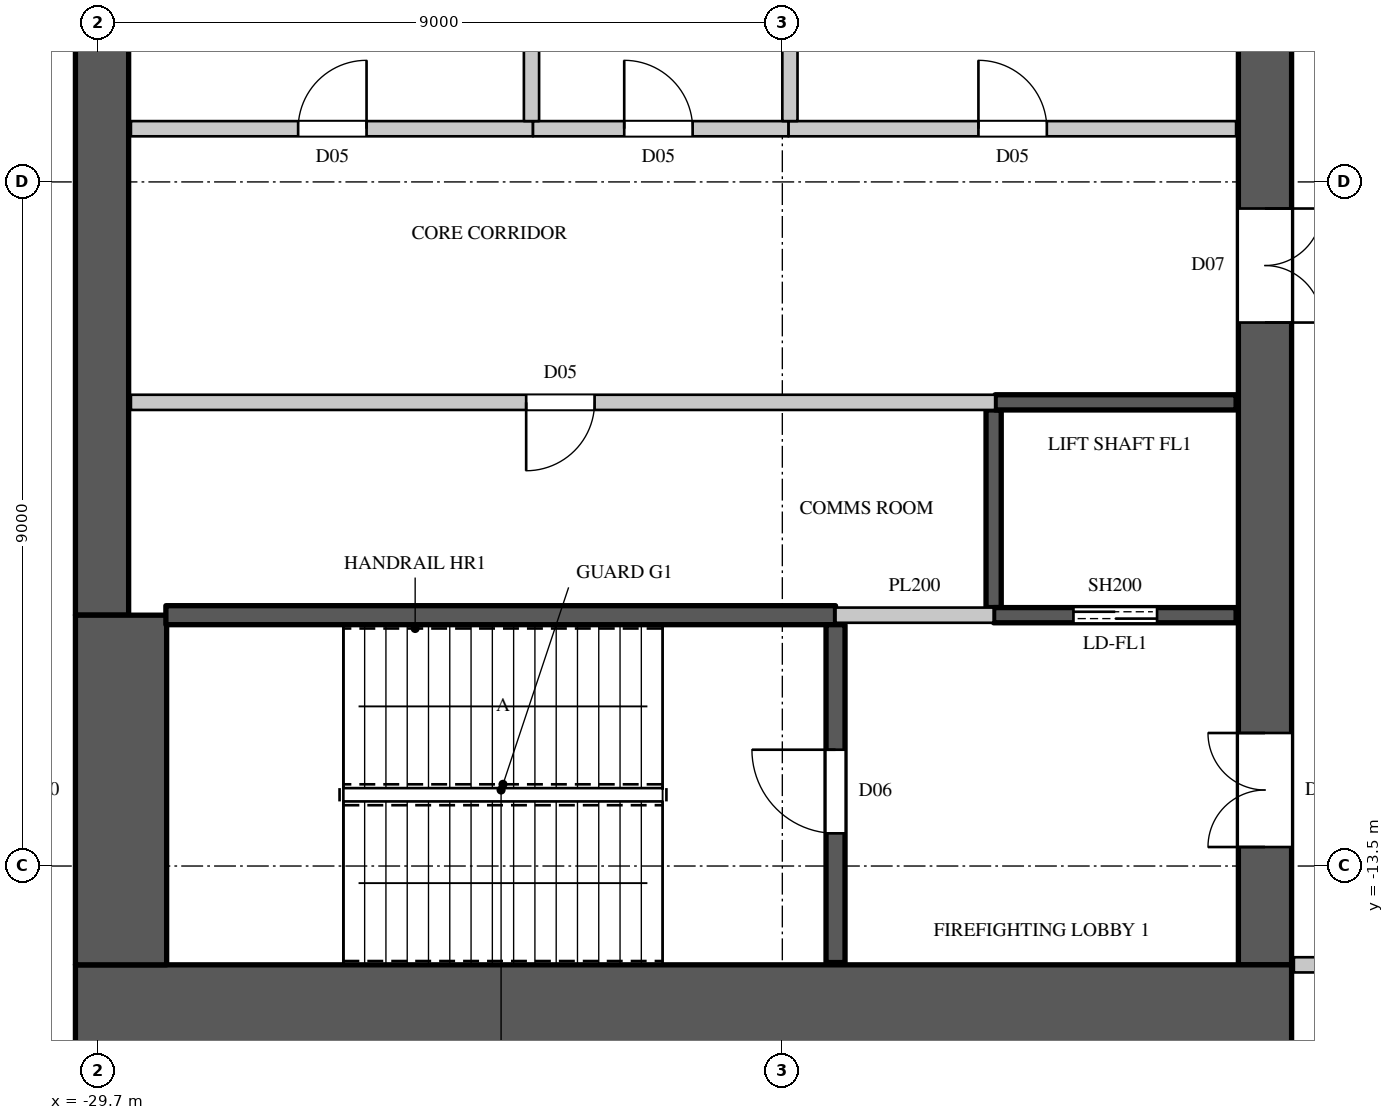
"""IFC4 building model, lengths in metres.
Left out: names, types, materials, properties, quantities, classifications, styles, units other than length and angle.
Written with IfcOpenShell. Run it as: python <this file> out.ifc"""

import sys

from ifc_helpers import new_model, si_unit, direction, frame, frame_2d, origin, place, context, subcontext, project, spatial, rectangle, extrude, element, fill, save


model = new_model("IFC4")
c1 = context("Model", 3, precision=1e-05, world=origin(), true_north=direction((0.0, 1.0)))
c2 = subcontext(c1, "Body", "Model", "MODEL_VIEW")
j1 = project(units=[si_unit("LENGTHUNIT", "METRE"), si_unit("PLANEANGLEUNIT", "RADIAN")], contexts=[c1])
p1 = place(None, origin())
s1 = spatial("IfcSite", under=j1, at=p1, CompositionType="ELEMENT")
p2 = place(p1, origin())
s2 = spatial("IfcBuilding", under=s1, at=p2, CompositionType="ELEMENT")
p3 = place(p2, frame((0.0, 0.0, 329.5)))
s3 = spatial("IfcBuildingStorey", under=s2, at=p3, CompositionType="ELEMENT", Elevation=329.5)
p4 = place(p3, frame((-30.0, -15.4, 0.0), z_axis=(0.0, 0.0, 1.0), x_axis=(1.0, 0.0, 0.0)))
e1 = element("IfcWall", 1, at=p4, inside=s3, PredefinedType="SHEAR", context=c2, shape_type="SweptSolid", body=[
    extrude(rectangle(XDim=16.0, YDim=1.2, at=frame_2d((8.0, 0.0))), origin(), (0.0, 0.0, 1.0), 5.5),
])
p5 = place(p3, frame((-14.35, -14.8, 0.0), z_axis=(0.0, 0.0, 1.0), x_axis=(0.0, 1.0, 0.0)))
e2 = element("IfcWall", 2, at=p5, inside=s3, PredefinedType="SHEAR", context=c2, shape_type="SweptSolid", body=[
    extrude(rectangle(XDim=29.6, YDim=0.7, at=frame_2d((14.8, 0.0))), origin(), (0.0, 0.0, 1.0), 5.5),
])
p6 = place(p5, frame((1.55, 0.0, 0.0)))
e3 = element("IfcOpeningElement", 3, at=p6, cuts=e2, PredefinedType="OPENING", context=c2, shape_type="SweptSolid", body=[
    extrude(rectangle(XDim=1.5, YDim=2.4, at=frame_2d((0.75, 1.2))), frame((0.0, 0.36, 0.0), z_axis=(0.0, -1.0, 0.0), x_axis=(1.0, 0.0, 0.0)), (0.0, 0.0, 1.0), 0.72),
])
p7 = place(p5, frame((26.55, 0.0, 0.0)))
e4 = element("IfcOpeningElement", 4, at=p7, cuts=e2, PredefinedType="OPENING", context=c2, shape_type="SweptSolid", body=[
    extrude(rectangle(XDim=1.5, YDim=2.4, at=frame_2d((0.75, 1.2))), frame((0.0, 0.36, 0.0), z_axis=(0.0, -1.0, 0.0), x_axis=(1.0, 0.0, 0.0)), (0.0, 0.0, 1.0), 0.72),
])
p8 = place(p5, frame((8.45, 0.0, 0.0)))
e5 = element("IfcOpeningElement", 5, at=p8, cuts=e2, PredefinedType="OPENING", context=c2, shape_type="SweptSolid", body=[
    extrude(rectangle(XDim=1.5, YDim=2.4, at=frame_2d((0.75, 1.2))), frame((0.0, 0.36, 0.0), z_axis=(0.0, -1.0, 0.0), x_axis=(1.0, 0.0, 0.0)), (0.0, 0.0, 1.0), 0.72),
])
p9 = place(p5, frame((19.65, 0.0, 0.0)))
e6 = element("IfcOpeningElement", 6, at=p9, cuts=e2, PredefinedType="OPENING", context=c2, shape_type="SweptSolid", body=[
    extrude(rectangle(XDim=1.5, YDim=2.4, at=frame_2d((0.75, 1.2))), frame((0.0, 0.36, 0.0), z_axis=(0.0, -1.0, 0.0), x_axis=(1.0, 0.0, 0.0)), (0.0, 0.0, 1.0), 0.72),
])
p10 = place(p5, frame((14.5, 0.0, 0.0)))
e7 = element("IfcOpeningElement", 7, at=p10, cuts=e2, PredefinedType="OPENING", context=c2, shape_type="SweptSolid", body=[
    extrude(rectangle(XDim=0.6, YDim=2.0, at=frame_2d((0.3, 1.0))), frame((0.0, 0.36, 0.0), z_axis=(0.0, -1.0, 0.0), x_axis=(1.0, 0.0, 0.0)), (0.0, 0.0, 1.0), 0.72),
])
p11 = place(p3, frame((-29.65, -10.2, 0.0), z_axis=(0.0, 0.0, 1.0), x_axis=(0.0, 1.0, 0.0)))
e8 = element("IfcWall", 8, at=p11, inside=s3, PredefinedType="SHEAR", context=c2, shape_type="SweptSolid", body=[
    extrude(rectangle(XDim=20.4, YDim=0.7, at=frame_2d((10.2, 0.0))), origin(), (0.0, 0.0, 1.0), 5.5),
])
p12 = place(p3, frame((-29.4, -14.8, 0.0), z_axis=(0.0, 0.0, 1.0), x_axis=(0.0, 1.0, 0.0)))
e9 = element("IfcWall", 9, at=p12, inside=s3, PredefinedType="SHEAR", context=c2, shape_type="SweptSolid", body=[
    extrude(rectangle(XDim=4.6, YDim=1.2, at=frame_2d((2.3, 0.0))), origin(), (0.0, 0.0, 1.0), 5.5),
])
p13 = place(p3, frame((-29.27, -3.8, 0.0), z_axis=(0.0, 0.0, 1.0), x_axis=(1.0, 0.0, 0.0)))
e10 = element("IfcWall", 10, at=p13, inside=s3, PredefinedType="PARTITIONING", context=c2, shape_type="SweptSolid", body=[
    extrude(rectangle(XDim=5.29, YDim=0.2, at=frame_2d((2.645, 0.0))), origin(), (0.0, 0.0, 1.0), 5.098),
])
p14 = place(p13, frame((2.2, 0.0, 0.0)))
e11 = element("IfcOpeningElement", 11, at=p14, cuts=e10, PredefinedType="OPENING", context=c2, shape_type="SweptSolid", body=[
    extrude(rectangle(XDim=0.9, YDim=2.2, at=frame_2d((0.45, 1.1))), frame((0.0, 0.11, 0.0), z_axis=(0.0, -1.0, 0.0), x_axis=(1.0, 0.0, 0.0)), (0.0, 0.0, 1.0), 0.22),
])
p15 = place(p3, frame((-20.62, -3.8, 0.0), z_axis=(0.0, 0.0, 1.0), x_axis=(1.0, 0.0, 0.0)))
e12 = element("IfcWall", 12, at=p15, inside=s3, PredefinedType="PARTITIONING", context=c2, shape_type="SweptSolid", body=[
    extrude(rectangle(XDim=5.89, YDim=0.2, at=frame_2d((2.945, 0.0))), origin(), (0.0, 0.0, 1.0), 5.098),
])
p16 = place(p15, frame((2.5, 0.0, 0.0)))
e13 = element("IfcOpeningElement", 13, at=p16, cuts=e12, PredefinedType="OPENING", context=c2, shape_type="SweptSolid", body=[
    extrude(rectangle(XDim=0.9, YDim=2.2, at=frame_2d((0.45, 1.1))), frame((0.0, 0.11, 0.0), z_axis=(0.0, -1.0, 0.0), x_axis=(1.0, 0.0, 0.0)), (0.0, 0.0, 1.0), 0.22),
])
p17 = place(p3, frame((-13.97, -14.8, 0.0), z_axis=(0.0, 0.0, 1.0), x_axis=(1.0, 0.0, 0.0)))
e14 = element("IfcWall", 14, at=p17, inside=s3, PredefinedType="PARTITIONING", context=c2, shape_type="SweptSolid", body=[
    extrude(rectangle(XDim=2.27, YDim=0.2, at=frame_2d((1.135, 0.0))), origin(), (0.0, 0.0, 1.0), 5.098),
])
p18 = place(p17, frame((0.3, 0.0, 0.0)))
e15 = element("IfcOpeningElement", 15, at=p18, cuts=e14, PredefinedType="OPENING", context=c2, shape_type="SweptSolid", body=[
    extrude(rectangle(XDim=1.6, YDim=2.4, at=frame_2d((0.8, 1.2))), frame((0.0, 0.11, 0.0), z_axis=(0.0, -1.0, 0.0), x_axis=(1.0, 0.0, 0.0)), (0.0, 0.0, 1.0), 0.22),
])
p19 = place(p3, frame((-29.27, -7.4, 0.0), z_axis=(0.0, 0.0, 1.0), x_axis=(1.0, 0.0, 0.0)))
e16 = element("IfcWall", 16, at=p19, inside=s3, PredefinedType="PARTITIONING", context=c2, shape_type="SweptSolid", body=[
    extrude(rectangle(XDim=11.37, YDim=0.2, at=frame_2d((5.685, 0.0))), origin(), (0.0, 0.0, 1.0), 5.098),
])
p20 = place(p19, frame((5.2, 0.0, 0.0)))
e17 = element("IfcOpeningElement", 17, at=p20, cuts=e16, PredefinedType="OPENING", context=c2, shape_type="SweptSolid", body=[
    extrude(rectangle(XDim=0.9, YDim=2.2, at=frame_2d((0.45, 1.1))), frame((0.0, 0.11, 0.0), z_axis=(0.0, -1.0, 0.0), x_axis=(1.0, 0.0, 0.0)), (0.0, 0.0, 1.0), 0.22),
])
p21 = place(p3, frame((-23.98, -3.8, 0.0), z_axis=(0.0, 0.0, 1.0), x_axis=(1.0, 0.0, 0.0)))
e18 = element("IfcWall", 18, at=p21, inside=s3, PredefinedType="PARTITIONING", context=c2, shape_type="SweptSolid", body=[
    extrude(rectangle(XDim=3.36, YDim=0.2, at=frame_2d((1.68, 0.0))), origin(), (0.0, 0.0, 1.0), 5.098),
])
p22 = place(p21, frame((1.2, 0.0, 0.0)))
e19 = element("IfcOpeningElement", 19, at=p22, cuts=e18, PredefinedType="OPENING", context=c2, shape_type="SweptSolid", body=[
    extrude(rectangle(XDim=0.9, YDim=2.2, at=frame_2d((0.45, 1.1))), frame((0.0, 0.11, 0.0), z_axis=(0.0, -1.0, 0.0), x_axis=(1.0, 0.0, 0.0)), (0.0, 0.0, 1.0), 0.22),
])
for number, where, z_axis, x_axis in (
    (20, (-24.0, -3.7, 0.0), (0.0, 0.0, 1.0), (0.0, 1.0, 0.0)),
    (21, (-20.6, -3.7, 0.0), (0.0, 0.0, 1.0), (0.0, 1.0, 0.0)),
):
    element("IfcWall", number, at=place(p3, frame(where, z_axis=z_axis, x_axis=x_axis)), inside=s3, PredefinedType="PARTITIONING", context=c2, shape_type="SweptSolid", body=[
        extrude(rectangle(XDim=2.6, YDim=0.2, at=frame_2d((1.3, 0.0))), origin(), (0.0, 0.0, 1.0), 5.098),
    ])
p23 = place(p3, frame((-20.0, -10.2, 0.0), z_axis=(0.0, 0.0, 1.0), x_axis=(1.0, 0.0, 0.0)))
e22 = element("IfcWall", 22, at=p23, inside=s3, PredefinedType="PARTITIONING", context=c2, shape_type="SweptSolid", body=[
    extrude(rectangle(XDim=2.08, YDim=0.2, at=frame_2d((1.04, 0.0))), origin(), (0.0, 0.0, 1.0), 5.098),
])
p24 = place(p3, frame((-17.92, -10.1, 0.0), z_axis=(0.0, 0.0, 1.0), x_axis=(0.0, 1.0, 0.0)))
e23 = element("IfcWall", 23, at=p24, inside=s3, PredefinedType="SHEAR", context=c2, shape_type="SweptSolid", body=[
    extrude(rectangle(XDim=2.6, YDim=0.2, at=frame_2d((1.3, 0.0))), origin(), (0.0, 0.0, 1.0), 5.098),
])
p25 = place(p3, frame((-17.92, -10.2, 0.0), z_axis=(0.0, 0.0, 1.0), x_axis=(1.0, 0.0, 0.0)))
e24 = element("IfcWall", 24, at=p25, inside=s3, PredefinedType="SHEAR", context=c2, shape_type="SweptSolid", body=[
    extrude(rectangle(XDim=3.19, YDim=0.2, at=frame_2d((1.595, 0.0))), origin(), (0.0, 0.0, 1.0), 5.098),
])
p26 = place(p25, frame((1.05, 0.0, 0.0)))
e25 = element("IfcOpeningElement", 25, at=p26, cuts=e24, PredefinedType="OPENING", context=c2, shape_type="SweptSolid", body=[
    extrude(rectangle(XDim=1.1, YDim=2.2, at=frame_2d((0.55, 1.1))), frame((0.0, 0.11, 0.0), z_axis=(0.0, -1.0, 0.0), x_axis=(1.0, 0.0, 0.0)), (0.0, 0.0, 1.0), 0.22),
])
p27 = place(p3, frame((-17.9, -7.4, 0.0), z_axis=(0.0, 0.0, 1.0), x_axis=(1.0, 0.0, 0.0)))
e26 = element("IfcWall", 26, at=p27, inside=s3, PredefinedType="SHEAR", context=c2, shape_type="SweptSolid", body=[
    extrude(rectangle(XDim=3.17, YDim=0.2, at=frame_2d((1.585, 0.0))), origin(), (0.0, 0.0, 1.0), 5.098),
])
p28 = place(p3, frame((-28.81, -10.2, 0.0), z_axis=(0.0, 0.0, 1.0), x_axis=(1.0, 0.0, 0.0)))
e27 = element("IfcWall", 27, at=p28, inside=s3, PredefinedType="SHEAR", context=c2, shape_type="SweptSolid", body=[
    extrude(rectangle(XDim=8.81, YDim=0.25, at=frame_2d((4.405, 0.0))), origin(), (0.0, 0.0, 1.0), 5.098),
])
p29 = place(p3, frame((-20.0, -14.77, 0.0), z_axis=(0.0, 0.0, 1.0), x_axis=(0.0, 1.0, 0.0)))
e28 = element("IfcWall", 28, at=p29, inside=s3, PredefinedType="SHEAR", context=c2, shape_type="SweptSolid", body=[
    extrude(rectangle(XDim=4.445, YDim=0.25, at=frame_2d((2.223, 0.0))), origin(), (0.0, 0.0, 1.0), 5.098),
])
p30 = place(p29, frame((1.7, 0.0, 0.0)))
e29 = element("IfcOpeningElement", 29, at=p30, cuts=e28, PredefinedType="OPENING", context=c2, shape_type="SweptSolid", body=[
    extrude(rectangle(XDim=1.1, YDim=2.2, at=frame_2d((0.55, 1.1))), frame((0.0, 0.135, 0.0), z_axis=(0.0, -1.0, 0.0), x_axis=(1.0, 0.0, 0.0)), (0.0, 0.0, 1.0), 0.27),
])
p31 = place(p30, origin())
e30 = element("IfcDoor", 30, at=p31, inside=s3, OperationType="SINGLE_SWING_RIGHT", PredefinedType="DOOR", context=c2, shape_type="SweptSolid", body=[
    extrude(rectangle(XDim=1.1, YDim=2.2, at=frame_2d((0.55, 1.1))), frame((0.0, 0.025, 0.0), z_axis=(0.0, -1.0, 0.0), x_axis=(1.0, 0.0, 0.0)), (0.0, 0.0, 1.0), 0.05),
])
fill(e29, e30)
p32 = place(p20, origin())
e31 = element("IfcDoor", 31, at=p32, inside=s3, OperationType="SINGLE_SWING_RIGHT", PredefinedType="DOOR", context=c2, shape_type="SweptSolid", body=[
    extrude(rectangle(XDim=0.9, YDim=2.2, at=frame_2d((0.45, 1.1))), frame((0.0, 0.025, 0.0), z_axis=(0.0, -1.0, 0.0), x_axis=(1.0, 0.0, 0.0)), (0.0, 0.0, 1.0), 0.05),
])
fill(e17, e31)
p33 = place(p14, origin())
e32 = element("IfcDoor", 32, at=p33, inside=s3, OperationType="SINGLE_SWING_RIGHT", PredefinedType="DOOR", context=c2, shape_type="SweptSolid", body=[
    extrude(rectangle(XDim=0.9, YDim=2.2, at=frame_2d((0.45, 1.1))), frame((0.0, 0.025, 0.0), z_axis=(0.0, -1.0, 0.0), x_axis=(1.0, 0.0, 0.0)), (0.0, 0.0, 1.0), 0.05),
])
fill(e11, e32)
p34 = place(p22, origin())
e33 = element("IfcDoor", 33, at=p34, inside=s3, OperationType="SINGLE_SWING_LEFT", PredefinedType="DOOR", context=c2, shape_type="SweptSolid", body=[
    extrude(rectangle(XDim=0.9, YDim=2.2, at=frame_2d((0.45, 1.1))), frame((0.0, 0.025, 0.0), z_axis=(0.0, -1.0, 0.0), x_axis=(1.0, 0.0, 0.0)), (0.0, 0.0, 1.0), 0.05),
])
fill(e19, e33)
p35 = place(p16, origin())
e34 = element("IfcDoor", 34, at=p35, inside=s3, OperationType="SINGLE_SWING_LEFT", PredefinedType="DOOR", context=c2, shape_type="SweptSolid", body=[
    extrude(rectangle(XDim=0.9, YDim=2.2, at=frame_2d((0.45, 1.1))), frame((0.0, 0.025, 0.0), z_axis=(0.0, -1.0, 0.0), x_axis=(1.0, 0.0, 0.0)), (0.0, 0.0, 1.0), 0.05),
])
fill(e13, e34)
p36 = place(p26, origin())
e35 = element("IfcDoor", 35, at=p36, inside=s3, OperationType="DOUBLE_DOOR_SLIDING", PredefinedType="DOOR", context=c2, shape_type="SweptSolid", body=[
    extrude(rectangle(XDim=1.1, YDim=2.2, at=frame_2d((0.55, 1.1))), frame((0.0, 0.025, 0.0), z_axis=(0.0, -1.0, 0.0), x_axis=(1.0, 0.0, 0.0)), (0.0, 0.0, 1.0), 0.05),
])
fill(e25, e35)
p37 = place(p6, origin())
e36 = element("IfcDoor", 36, at=p37, inside=s3, OperationType="DOUBLE_DOOR_SINGLE_SWING", PredefinedType="DOOR", context=c2, shape_type="SweptSolid", body=[
    extrude(rectangle(XDim=1.5, YDim=2.4, at=frame_2d((0.75, 1.2))), frame((0.0, 0.345, 0.0), z_axis=(0.0, -1.0, 0.0), x_axis=(1.0, 0.0, 0.0)), (0.0, 0.0, 1.0), 0.05),
])
fill(e3, e36)
p38 = place(p8, origin())
e37 = element("IfcDoor", 37, at=p38, inside=s3, OperationType="DOUBLE_DOOR_SINGLE_SWING", PredefinedType="DOOR", context=c2, shape_type="SweptSolid", body=[
    extrude(rectangle(XDim=1.5, YDim=2.4, at=frame_2d((0.75, 1.2))), frame((0.0, -0.295, 0.0), z_axis=(0.0, -1.0, 0.0), x_axis=(1.0, 0.0, 0.0)), (0.0, 0.0, 1.0), 0.05),
])
fill(e5, e37)
save(model, sys.argv[1])
